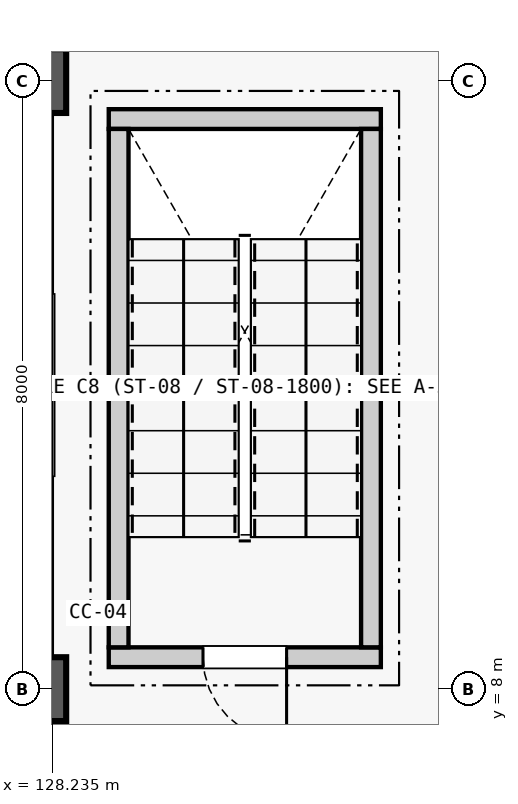
"""IFC4 building model, lengths in metres.
Left out: names, types, materials, properties, quantities, classifications, styles, units other than length and angle.
Written with IfcOpenShell. Run it as: python <this file> out.ifc"""

import sys

from ifc_helpers import new_model, si_unit, direction, frame, frame_2d, origin, origin_2d, place, context, subcontext, project, spatial, rectangle, circle, extrude, element, fill, save


model = new_model("IFC4")
c1 = context("Model", 3, precision=1e-05, world=origin(), true_north=direction((0.0, 1.0)))
c2 = subcontext(c1, "Body", "Model", "MODEL_VIEW")
j1 = project(units=[si_unit("LENGTHUNIT", "METRE"), si_unit("PLANEANGLEUNIT", "RADIAN")], contexts=[c1])
p1 = place(None, origin())
s1 = spatial("IfcSite", under=j1, at=p1, CompositionType="ELEMENT")
p2 = place(p1, origin())
s2 = spatial("IfcBuilding", under=s1, at=p2, CompositionType="ELEMENT")
p3 = place(p2, origin())
s3 = spatial("IfcBuildingStorey", under=s2, at=p3, CompositionType="ELEMENT", Elevation=0.0)
for number, where, z_axis, x_axis in (
    (1, (128.0, 8.0, 0.0), (0.0, 0.0, 1.0), (1.0, 0.0, 0.0)),
    (2, (128.0, 16.0, 0.0), (0.0, 0.0, 1.0), (1.0, 0.0, 0.0)),
):
    element("IfcColumn", number, at=place(p3, frame(where, z_axis=z_axis, x_axis=x_axis)), inside=s3, PredefinedType="COLUMN", context=c2, shape_type="SweptSolid", body=[
        extrude(circle(Radius=0.42, at=origin_2d()), origin(), (0.0, 0.0, 1.0), 5.4),
    ])
p4 = place(p3, frame((128.0, 7.622, 0.0), z_axis=(0.0, 0.0, 1.0), x_axis=(0.0, -1.0, 0.0)))
e3 = element("IfcWall", 3, at=p4, inside=s3, PredefinedType="STANDARD", context=c2, shape_type="SweptSolid", body=[
    extrude(rectangle(XDim=7.244, YDim=0.48, at=frame_2d((3.622, 0.0))), origin(), (0.0, 0.0, 1.0), 3.91),
])
p5 = place(p4, frame((2.322, 0.0, 0.72)))
e4 = element("IfcOpeningElement", 4, at=p5, cuts=e3, PredefinedType="OPENING", context=c2, shape_type="SweptSolid", body=[
    extrude(rectangle(XDim=2.6, YDim=2.4, at=frame_2d((1.3, 1.2))), frame((0.0, 0.252, 0.0), z_axis=(0.0, -1.0, 0.0), x_axis=(1.0, 0.0, 0.0)), (0.0, 0.0, 1.0), 0.504),
])
p6 = place(p3, frame((128.0, 15.622, 0.0), z_axis=(0.0, 0.0, 1.0), x_axis=(0.0, -1.0, 0.0)))
e5 = element("IfcWall", 5, at=p6, inside=s3, PredefinedType="STANDARD", context=c2, shape_type="SweptSolid", body=[
    extrude(rectangle(XDim=7.244, YDim=0.48, at=frame_2d((3.622, 0.0))), origin(), (0.0, 0.0, 1.0), 3.91),
])
p7 = place(p6, frame((2.422, 0.0, 0.72)))
e6 = element("IfcOpeningElement", 6, at=p7, cuts=e5, PredefinedType="OPENING", context=c2, shape_type="SweptSolid", body=[
    extrude(rectangle(XDim=2.4, YDim=2.6, at=frame_2d((1.2, 1.3))), frame((0.0, 0.252, 0.0), z_axis=(0.0, -1.0, 0.0), x_axis=(1.0, 0.0, 0.0)), (0.0, 0.0, 1.0), 0.504),
])
p8 = place(p3, frame((128.0, 23.622, 0.0), z_axis=(0.0, 0.0, 1.0), x_axis=(0.0, -1.0, 0.0)))
e7 = element("IfcWall", 7, at=p8, inside=s3, PredefinedType="STANDARD", context=c2, shape_type="SweptSolid", body=[
    extrude(rectangle(XDim=7.244, YDim=0.48, at=frame_2d((3.622, 0.0))), origin(), (0.0, 0.0, 1.0), 3.91),
])
p9 = place(p8, frame((2.722, 0.0, 0.72)))
e8 = element("IfcOpeningElement", 8, at=p9, cuts=e7, PredefinedType="OPENING", context=c2, shape_type="SweptSolid", body=[
    extrude(rectangle(XDim=1.8, YDim=2.1, at=frame_2d((0.9, 1.05))), frame((0.0, 0.252, 0.0), z_axis=(0.0, -1.0, 0.0), x_axis=(1.0, 0.0, 0.0)), (0.0, 0.0, 1.0), 0.504),
])
p10 = place(p3, frame((128.98, 8.42, 0.0), z_axis=(0.0, 0.0, 1.0), x_axis=(1.0, 0.0, 0.0)))
e9 = element("IfcWall", 9, at=p10, inside=s3, PredefinedType="SOLIDWALL", context=c2, shape_type="SweptSolid", body=[
    extrude(rectangle(XDim=3.58, YDim=0.26, at=frame_2d((1.79, 0.0))), origin(), (0.0, 0.0, 1.0), 5.4),
])
p11 = place(p10, frame((1.24, 0.0, 0.0)))
e10 = element("IfcOpeningElement", 10, at=p11, cuts=e9, PredefinedType="OPENING", context=c2, shape_type="SweptSolid", body=[
    extrude(rectangle(XDim=1.1, YDim=2.2, at=frame_2d((0.55, 1.1))), frame((0.0, 0.142, 0.0), z_axis=(0.0, -1.0, 0.0), x_axis=(1.0, 0.0, 0.0)), (0.0, 0.0, 1.0), 0.284),
])
p12 = place(p3, frame((128.98, 15.5, 0.0), z_axis=(0.0, 0.0, 1.0), x_axis=(1.0, 0.0, 0.0)))
e11 = element("IfcWall", 11, at=p12, inside=s3, PredefinedType="SOLIDWALL", context=c2, shape_type="SweptSolid", body=[
    extrude(rectangle(XDim=3.58, YDim=0.26, at=frame_2d((1.79, 0.0))), origin(), (0.0, 0.0, 1.0), 5.4),
])
for number, where, z_axis, x_axis in (
    (12, (129.11, 8.55, 0.0), (0.0, 0.0, 1.0), (0.0, 1.0, 0.0)),
    (13, (132.43, 8.55, 0.0), (0.0, 0.0, 1.0), (0.0, 1.0, 0.0)),
):
    element("IfcWall", number, at=place(p3, frame(where, z_axis=z_axis, x_axis=x_axis)), inside=s3, PredefinedType="SOLIDWALL", context=c2, shape_type="SweptSolid", body=[
        extrude(rectangle(XDim=6.82, YDim=0.26, at=frame_2d((3.41, 0.0))), origin(), (0.0, 0.0, 1.0), 5.4),
    ])
p13 = place(p11, frame((1.1, 0.0, 0.0), z_axis=(0.0, 0.0, 1.0), x_axis=(-1.0, 0.0, 0.0)))
e14 = element("IfcDoor", 14, at=p13, inside=s3, OperationType="SINGLE_SWING_RIGHT", PredefinedType="DOOR", context=c2, shape_type="SweptSolid", body=[
    extrude(rectangle(XDim=1.1, YDim=2.2, at=frame_2d((0.55, 1.1))), frame((0.0, 0.025, 0.0), z_axis=(0.0, -1.0, 0.0), x_axis=(1.0, 0.0, 0.0)), (0.0, 0.0, 1.0), 0.05),
])
fill(e10, e14)
save(model, sys.argv[1])
